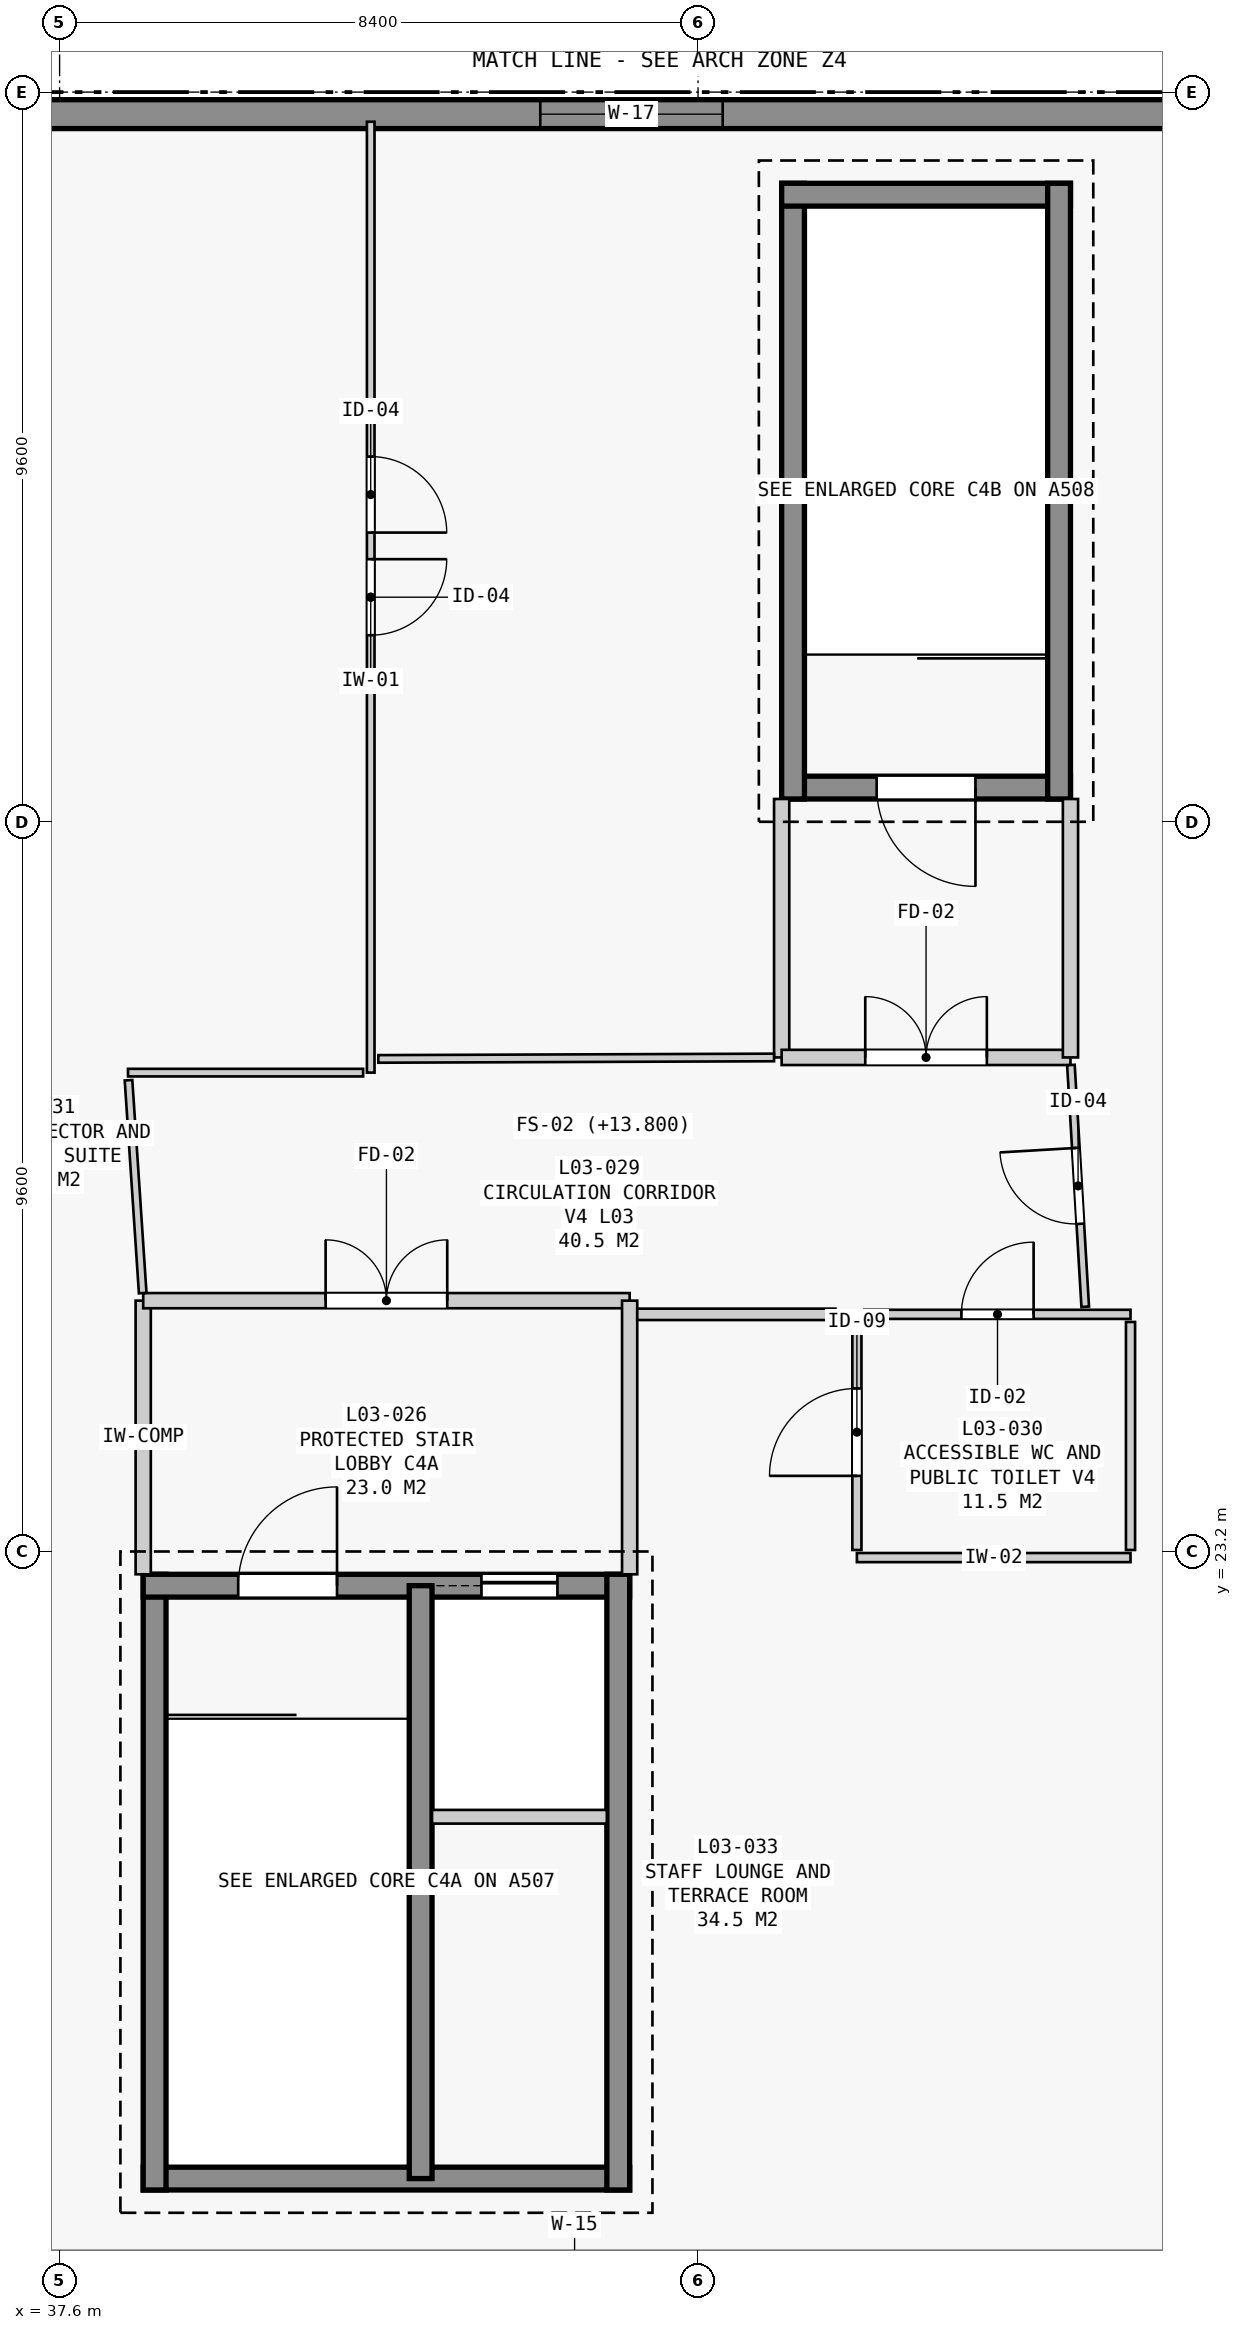
"""IFC4 building model, lengths in metres.
Left out: names, types, materials, properties, quantities, classifications, styles, units other than length and angle.
Written with IfcOpenShell. Run it as: python <this file> out.ifc"""

import sys

from ifc_helpers import new_model, si_unit, direction, frame, frame_2d, origin, place, context, subcontext, project, spatial, rectangle, extrude, element, fill, save


model = new_model("IFC4")
c1 = context("Model", 3, precision=1e-05, world=origin(), true_north=direction((0.0, 1.0)))
c2 = subcontext(c1, "Body", "Model", "MODEL_VIEW")
j1 = project(units=[si_unit("LENGTHUNIT", "METRE"), si_unit("PLANEANGLEUNIT", "RADIAN")], contexts=[c1])
p1 = place(None, origin())
s1 = spatial("IfcSite", under=j1, at=p1, CompositionType="ELEMENT")
p2 = place(p1, origin())
s2 = spatial("IfcBuilding", under=s1, at=p2, CompositionType="ELEMENT")
p3 = place(p2, frame((0.0, 0.0, 13.8)))
s3 = spatial("IfcBuildingStorey", under=s2, at=p3, CompositionType="ELEMENT", Elevation=13.8)
p4 = place(p3, frame((35.39, 42.11, 0.0), z_axis=(0.0, 0.0, 1.0), x_axis=(1.0, 0.0, 0.0)))
e1 = element("IfcWall", 1, at=p4, inside=s3, PredefinedType="STANDARD", context=c2, shape_type="SweptSolid", body=[
    extrude(rectangle(XDim=18.72, YDim=0.38, at=frame_2d((9.36, 0.0))), origin(), (0.0, 0.0, 1.0), 4.24),
])
p5 = place(p4, frame((8.534, 0.0, 1.65)))
e2 = element("IfcOpeningElement", 2, at=p5, cuts=e1, PredefinedType="OPENING", context=c2, shape_type="SweptSolid", body=[
    extrude(rectangle(XDim=2.4, YDim=1.8, at=frame_2d((1.2, 0.9))), frame((0.0, 0.2, 0.0), z_axis=(0.0, -1.0, 0.0), x_axis=(1.0, 0.0, 0.0)), (0.0, 0.0, 1.0), 0.4),
])
p6 = place(p3, frame((45.1, 14.95, 0.0), z_axis=(0.0, 0.0, 1.0), x_axis=(-1.0, 0.0, 0.0)))
e3 = element("IfcWall", 3, at=p6, inside=s3, PredefinedType="SHEAR", context=c2, shape_type="SweptSolid", body=[
    extrude(rectangle(XDim=6.4, YDim=0.3, at=frame_2d((3.2, 0.0))), origin(), (0.0, 0.0, 1.0), 4.5),
])
p7 = place(p3, frame((38.85, 14.8, 0.0), z_axis=(0.0, 0.0, 1.0), x_axis=(0.0, 1.0, 0.0)))
e4 = element("IfcWall", 4, at=p7, inside=s3, PredefinedType="SHEAR", context=c2, shape_type="SweptSolid", body=[
    extrude(rectangle(XDim=8.1, YDim=0.3, at=frame_2d((4.05, 0.0))), origin(), (0.0, 0.0, 1.0), 4.5),
])
p8 = place(p3, frame((38.7, 22.75, 0.0), z_axis=(0.0, 0.0, 1.0), x_axis=(1.0, 0.0, 0.0)))
e5 = element("IfcWall", 5, at=p8, inside=s3, PredefinedType="SHEAR", context=c2, shape_type="SweptSolid", body=[
    extrude(rectangle(XDim=6.4, YDim=0.3, at=frame_2d((3.2, 0.0))), origin(), (0.0, 0.0, 1.0), 4.5),
])
p9 = place(p8, frame((1.25, 0.0, 0.0)))
e6 = element("IfcOpeningElement", 6, at=p9, cuts=e5, PredefinedType="OPENING", context=c2, shape_type="SweptSolid", body=[
    extrude(rectangle(XDim=1.3, YDim=2.2, at=frame_2d((0.65, 1.1))), frame((0.0, 0.16, 0.0), z_axis=(0.0, -1.0, 0.0), x_axis=(1.0, 0.0, 0.0)), (0.0, 0.0, 1.0), 0.32),
])
p10 = place(p8, frame((4.45, 0.0, 0.0)))
e7 = element("IfcOpeningElement", 7, at=p10, cuts=e5, PredefinedType="OPENING", context=c2, shape_type="SweptSolid", body=[
    extrude(rectangle(XDim=1.0, YDim=2.15, at=frame_2d((0.5, 1.075))), frame((0.0, 0.16, 0.0), z_axis=(0.0, -1.0, 0.0), x_axis=(1.0, 0.0, 0.0)), (0.0, 0.0, 1.0), 0.32),
])
p11 = place(p3, frame((44.95, 22.9, 0.0), z_axis=(0.0, 0.0, 1.0), x_axis=(0.0, -1.0, 0.0)))
e8 = element("IfcWall", 8, at=p11, inside=s3, PredefinedType="SHEAR", context=c2, shape_type="SweptSolid", body=[
    extrude(rectangle(XDim=8.1, YDim=0.3, at=frame_2d((4.05, 0.0))), origin(), (0.0, 0.0, 1.0), 4.5),
])
p12 = place(p3, frame((42.35, 14.95, 0.0), z_axis=(0.0, 0.0, 1.0), x_axis=(0.0, 1.0, 0.0)))
e9 = element("IfcWall", 9, at=p12, inside=s3, PredefinedType="SHEAR", context=c2, shape_type="SweptSolid", body=[
    extrude(rectangle(XDim=7.8, YDim=0.3, at=frame_2d((3.9, 0.0))), origin(), (0.0, 0.0, 1.0), 4.5),
])
p13 = place(p3, frame((42.5, 19.71, 0.0), z_axis=(0.0, 0.0, 1.0), x_axis=(1.0, 0.0, 0.0)))
e10 = element("IfcWall", 10, at=p13, inside=s3, PredefinedType="PARTITIONING", context=c2, shape_type="SweptSolid", body=[
    extrude(rectangle(XDim=2.3, YDim=0.18, at=frame_2d((1.15, 0.0))), origin(), (0.0, 0.0, 1.0), 4.5),
])
p14 = place(p3, frame((38.7, 22.9, 0.0), z_axis=(0.0, 0.0, 1.0), x_axis=(0.0, 1.0, 0.0)))
e11 = element("IfcWall", 11, at=p14, inside=s3, PredefinedType="STANDARD", context=c2, shape_type="SweptSolid", body=[
    extrude(rectangle(XDim=3.6, YDim=0.2, at=frame_2d((1.8, 0.0))), origin(), (0.0, 0.0, 1.0), 3.52),
])
p15 = place(p3, frame((38.7, 26.5, 0.0), z_axis=(0.0, 0.0, 1.0), x_axis=(1.0, 0.0, 0.0)))
e12 = element("IfcWall", 12, at=p15, inside=s3, PredefinedType="STANDARD", context=c2, shape_type="SweptSolid", body=[
    extrude(rectangle(XDim=6.4, YDim=0.2, at=frame_2d((3.2, 0.0))), origin(), (0.0, 0.0, 1.0), 3.77),
])
p16 = place(p15, frame((2.4, 0.0, 0.0)))
e13 = element("IfcOpeningElement", 13, at=p16, cuts=e12, PredefinedType="OPENING", context=c2, shape_type="SweptSolid", body=[
    extrude(rectangle(XDim=1.6, YDim=2.2, at=frame_2d((0.8, 1.1))), frame((0.0, 0.11, 0.0), z_axis=(0.0, -1.0, 0.0), x_axis=(1.0, 0.0, 0.0)), (0.0, 0.0, 1.0), 0.22),
])
p17 = place(p3, frame((45.1, 26.5, 0.0), z_axis=(0.0, 0.0, 1.0), x_axis=(0.0, -1.0, 0.0)))
e14 = element("IfcWall", 14, at=p17, inside=s3, PredefinedType="STANDARD", context=c2, shape_type="SweptSolid", body=[
    extrude(rectangle(XDim=3.6, YDim=0.2, at=frame_2d((1.8, 0.0))), origin(), (0.0, 0.0, 1.0), 3.52),
])
p18 = place(p3, frame((50.9, 33.25, 0.0), z_axis=(0.0, 0.0, 1.0), x_axis=(-1.0, 0.0, 0.0)))
e15 = element("IfcWall", 15, at=p18, inside=s3, PredefinedType="SHEAR", context=c2, shape_type="SweptSolid", body=[
    extrude(rectangle(XDim=3.8, YDim=0.3, at=frame_2d((1.9, 0.0))), origin(), (0.0, 0.0, 1.0), 4.5),
])
p19 = place(p18, frame((1.25, 0.0, 0.0)))
e16 = element("IfcOpeningElement", 16, at=p19, cuts=e15, PredefinedType="OPENING", context=c2, shape_type="SweptSolid", body=[
    extrude(rectangle(XDim=1.3, YDim=2.2, at=frame_2d((0.65, 1.1))), frame((0.0, 0.16, 0.0), z_axis=(0.0, -1.0, 0.0), x_axis=(1.0, 0.0, 0.0)), (0.0, 0.0, 1.0), 0.32),
])
p20 = place(p3, frame((47.25, 33.1, 0.0), z_axis=(0.0, 0.0, 1.0), x_axis=(0.0, 1.0, 0.0)))
e17 = element("IfcWall", 17, at=p20, inside=s3, PredefinedType="SHEAR", context=c2, shape_type="SweptSolid", body=[
    extrude(rectangle(XDim=8.1, YDim=0.3, at=frame_2d((4.05, 0.0))), origin(), (0.0, 0.0, 1.0), 4.5),
])
p21 = place(p3, frame((47.1, 41.05, 0.0), z_axis=(0.0, 0.0, 1.0), x_axis=(1.0, 0.0, 0.0)))
e18 = element("IfcWall", 18, at=p21, inside=s3, PredefinedType="SHEAR", context=c2, shape_type="SweptSolid", body=[
    extrude(rectangle(XDim=3.8, YDim=0.3, at=frame_2d((1.9, 0.0))), origin(), (0.0, 0.0, 1.0), 4.5),
])
p22 = place(p3, frame((50.75, 41.2, 0.0), z_axis=(0.0, 0.0, 1.0), x_axis=(0.0, -1.0, 0.0)))
e19 = element("IfcWall", 19, at=p22, inside=s3, PredefinedType="SHEAR", context=c2, shape_type="SweptSolid", body=[
    extrude(rectangle(XDim=8.1, YDim=0.3, at=frame_2d((4.05, 0.0))), origin(), (0.0, 0.0, 1.0), 4.5),
])
p23 = place(p3, frame((47.1, 33.1, 0.0), z_axis=(0.0, 0.0, 1.0), x_axis=(0.0, -1.0, 0.0)))
e20 = element("IfcWall", 20, at=p23, inside=s3, PredefinedType="STANDARD", context=c2, shape_type="SweptSolid", body=[
    extrude(rectangle(XDim=3.4, YDim=0.2, at=frame_2d((1.7, 0.0))), origin(), (0.0, 0.0, 1.0), 3.47),
])
p24 = place(p3, frame((47.1, 29.7, 0.0), z_axis=(0.0, 0.0, 1.0), x_axis=(1.0, 0.0, 0.0)))
e21 = element("IfcWall", 21, at=p24, inside=s3, PredefinedType="STANDARD", context=c2, shape_type="SweptSolid", body=[
    extrude(rectangle(XDim=3.8, YDim=0.2, at=frame_2d((1.9, 0.0))), origin(), (0.0, 0.0, 1.0), 4.5),
])
p25 = place(p24, frame((1.1, 0.0, 0.0)))
e22 = element("IfcOpeningElement", 22, at=p25, cuts=e21, PredefinedType="OPENING", context=c2, shape_type="SweptSolid", body=[
    extrude(rectangle(XDim=1.6, YDim=2.2, at=frame_2d((0.8, 1.1))), frame((0.0, 0.11, 0.0), z_axis=(0.0, -1.0, 0.0), x_axis=(1.0, 0.0, 0.0)), (0.0, 0.0, 1.0), 0.22),
])
p26 = place(p3, frame((50.9, 29.7, 0.0), z_axis=(0.0, 0.0, 1.0), x_axis=(0.0, 1.0, 0.0)))
e23 = element("IfcWall", 23, at=p26, inside=s3, PredefinedType="STANDARD", context=c2, shape_type="SweptSolid", body=[
    extrude(rectangle(XDim=3.4, YDim=0.2, at=frame_2d((1.7, 0.0))), origin(), (0.0, 0.0, 1.0), 3.47),
])
p27 = place(p3, frame((51.69, 23.12, 0.0), z_axis=(0.0, 0.0, 1.0), x_axis=(-1.0, 0.0, 0.0)))
e24 = element("IfcWall", 24, at=p27, inside=s3, PredefinedType="PARTITIONING", context=c2, shape_type="SweptSolid", body=[
    extrude(rectangle(XDim=3.6, YDim=0.12, at=frame_2d((1.8, 0.0))), origin(), (0.0, 0.0, 1.0), 3.52),
])
p28 = place(p3, frame((48.09, 23.22, 0.0), z_axis=(0.0, 0.0, 1.0), x_axis=(0.0, 1.0, 0.0)))
e25 = element("IfcWall", 25, at=p28, inside=s3, PredefinedType="PARTITIONING", context=c2, shape_type="SweptSolid", body=[
    extrude(rectangle(XDim=3.1, YDim=0.12, at=frame_2d((1.55, 0.0))), origin(), (0.0, 0.0, 1.0), 3.52),
])
p29 = place(p28, frame((0.975, 0.0, 0.0)))
e26 = element("IfcOpeningElement", 26, at=p29, cuts=e25, PredefinedType="OPENING", context=c2, shape_type="SweptSolid", body=[
    extrude(rectangle(XDim=1.15, YDim=2.2, at=frame_2d((0.575, 1.1))), frame((0.0, 0.07, 0.0), z_axis=(0.0, -1.0, 0.0), x_axis=(1.0, 0.0, 0.0)), (0.0, 0.0, 1.0), 0.14),
])
p30 = place(p3, frame((48.19, 26.32, 0.0), z_axis=(0.0, 0.0, 1.0), x_axis=(1.0, 0.0, 0.0)))
e27 = element("IfcWall", 27, at=p30, inside=s3, PredefinedType="PARTITIONING", context=c2, shape_type="SweptSolid", body=[
    extrude(rectangle(XDim=3.5, YDim=0.12, at=frame_2d((1.75, 0.0))), origin(), (0.0, 0.0, 1.0), 4.24),
])
p31 = place(p30, frame((1.275, 0.0, 0.0)))
e28 = element("IfcOpeningElement", 28, at=p31, cuts=e27, PredefinedType="OPENING", context=c2, shape_type="SweptSolid", body=[
    extrude(rectangle(XDim=0.95, YDim=2.15, at=frame_2d((0.475, 1.075))), frame((0.0, 0.07, 0.0), z_axis=(0.0, -1.0, 0.0), x_axis=(1.0, 0.0, 0.0)), (0.0, 0.0, 1.0), 0.14),
])
p32 = place(p3, frame((51.69, 26.22, 0.0), z_axis=(0.0, 0.0, 1.0), x_axis=(0.0, -1.0, 0.0)))
e29 = element("IfcWall", 29, at=p32, inside=s3, PredefinedType="PARTITIONING", context=c2, shape_type="SweptSolid", body=[
    extrude(rectangle(XDim=3.0, YDim=0.12, at=frame_2d((1.5, 0.0))), origin(), (0.0, 0.0, 1.0), 3.52),
])
p33 = place(p3, frame((41.693, 42.01, 0.0), z_axis=(0.0, 0.0, 1.0), x_axis=(0.0, -1.0, 0.0)))
e30 = element("IfcWall", 30, at=p33, inside=s3, PredefinedType="PARTITIONING", context=c2, shape_type="SweptSolid", body=[
    extrude(rectangle(XDim=12.51, YDim=0.1, at=frame_2d((6.255, 0.0))), origin(), (0.0, 0.0, 1.0), 3.42),
])
p34 = place(p33, frame((5.755, 0.0, 0.0)))
e31 = element("IfcOpeningElement", 31, at=p34, cuts=e30, PredefinedType="OPENING", context=c2, shape_type="SweptSolid", body=[
    extrude(rectangle(XDim=1.0, YDim=2.15, at=frame_2d((0.5, 1.075))), frame((0.0, 0.06, 0.0), z_axis=(0.0, -1.0, 0.0), x_axis=(1.0, 0.0, 0.0)), (0.0, 0.0, 1.0), 0.12),
])
p35 = place(p33, frame((4.405, 0.0, 0.0)))
e32 = element("IfcOpeningElement", 32, at=p35, cuts=e30, PredefinedType="OPENING", context=c2, shape_type="SweptSolid", body=[
    extrude(rectangle(XDim=1.0, YDim=2.15, at=frame_2d((0.5, 1.075))), frame((0.0, 0.06, 0.0), z_axis=(0.0, -1.0, 0.0), x_axis=(1.0, 0.0, 0.0)), (0.0, 0.0, 1.0), 0.12),
])
p36 = place(p3, frame((41.593, 29.5, 0.0), z_axis=(0.0, 0.0, 1.0), x_axis=(-1.0, 0.0, 0.0)))
e33 = element("IfcWall", 33, at=p36, inside=s3, PredefinedType="PARTITIONING", context=c2, shape_type="SweptSolid", body=[
    extrude(rectangle(XDim=3.093, YDim=0.1, at=frame_2d((1.547, 0.0))), origin(), (0.0, 0.0, 1.0), 4.24),
])
p37 = place(p3, frame((38.507, 29.4, 0.0), z_axis=(0.0, 0.0, 1.0), x_axis=(0.066547879088, -0.997783232866, 0.0)))
e34 = element("IfcWall", 34, at=p37, inside=s3, PredefinedType="PARTITIONING", context=c2, shape_type="SweptSolid", body=[
    extrude(rectangle(XDim=2.806, YDim=0.1, at=frame_2d((1.403, 0.0))), origin(), (0.0, 0.0, 1.0), 4.24),
])
p38 = place(p3, frame((47.0, 29.7, 0.0), z_axis=(0.0, 0.0, 1.0), x_axis=(-0.99999313943, -0.003704199279, 0.0)))
e35 = element("IfcWall", 35, at=p38, inside=s3, PredefinedType="PARTITIONING", context=c2, shape_type="SweptSolid", body=[
    extrude(rectangle(XDim=5.207, YDim=0.1, at=frame_2d((2.604, 0.0))), origin(), (0.0, 0.0, 1.0), 3.77),
])
p39 = place(p3, frame((45.2, 26.32, 0.0), z_axis=(0.0, 0.0, 1.0), x_axis=(1.0, 0.0, 0.0)))
e36 = element("IfcWall", 36, at=p39, inside=s3, PredefinedType="PARTITIONING", context=c2, shape_type="SweptSolid", body=[
    extrude(rectangle(XDim=2.607, YDim=0.15, at=frame_2d((1.303, 0.0))), origin(), (0.0, 0.0, 1.0), 4.24),
])
p40 = place(p3, frame((51.094, 26.42, 0.0), z_axis=(0.0, 0.0, 1.0), x_axis=(-0.059009535749, 0.998257419051, 0.0)))
e37 = element("IfcWall", 37, at=p40, inside=s3, PredefinedType="PARTITIONING", context=c2, shape_type="SweptSolid", body=[
    extrude(rectangle(XDim=3.186, YDim=0.1, at=frame_2d((1.593, 0.0))), origin(), (0.0, 0.0, 1.0), 4.24),
])
p41 = place(p40, frame((1.093, 0.0, 0.0)))
e38 = element("IfcOpeningElement", 38, at=p41, cuts=e37, PredefinedType="OPENING", context=c2, shape_type="SweptSolid", body=[
    extrude(rectangle(XDim=1.0, YDim=2.15, at=frame_2d((0.5, 1.075))), frame((0.0, 0.06, 0.0), z_axis=(0.0, -1.0, 0.0), x_axis=(1.0, 0.0, 0.0)), (0.0, 0.0, 1.0), 0.12),
])
p42 = place(p5, origin())
e39 = element("IfcWindow", 39, at=p42, inside=s3, PartitioningType="SINGLE_PANEL", PredefinedType="WINDOW", context=c2, shape_type="SweptSolid", body=[
    extrude(rectangle(XDim=2.4, YDim=1.8, at=frame_2d((1.2, 0.9))), frame((0.0, 0.03, 0.0), z_axis=(0.0, -1.0, 0.0), x_axis=(1.0, 0.0, 0.0)), (0.0, 0.0, 1.0), 0.06),
])
fill(e2, e39)
p43 = place(p9, origin())
e40 = element("IfcDoor", 40, at=p43, inside=s3, OperationType="SINGLE_SWING_RIGHT", PredefinedType="DOOR", context=c2, shape_type="SweptSolid", body=[
    extrude(rectangle(XDim=1.3, YDim=2.2, at=frame_2d((0.65, 1.1))), frame((0.0, 0.025, 0.0), z_axis=(0.0, -1.0, 0.0), x_axis=(1.0, 0.0, 0.0)), (0.0, 0.0, 1.0), 0.05),
])
fill(e6, e40)
p44 = place(p10, origin())
e41 = element("IfcDoor", 41, at=p44, inside=s3, OperationType="SLIDING_TO_LEFT", PredefinedType="DOOR", context=c2, shape_type="SweptSolid", body=[
    extrude(rectangle(XDim=1.0, YDim=2.15, at=frame_2d((0.5, 1.075))), frame((0.0, 0.025, 0.0), z_axis=(0.0, -1.0, 0.0), x_axis=(1.0, 0.0, 0.0)), (0.0, 0.0, 1.0), 0.05),
])
fill(e7, e41)
p45 = place(p19, origin())
e42 = element("IfcDoor", 42, at=p45, inside=s3, OperationType="SINGLE_SWING_LEFT", PredefinedType="DOOR", context=c2, shape_type="SweptSolid", body=[
    extrude(rectangle(XDim=1.3, YDim=2.2, at=frame_2d((0.65, 1.1))), frame((0.0, 0.025, 0.0), z_axis=(0.0, -1.0, 0.0), x_axis=(1.0, 0.0, 0.0)), (0.0, 0.0, 1.0), 0.05),
])
fill(e16, e42)
p46 = place(p16, origin())
e43 = element("IfcDoor", 43, at=p46, inside=s3, OperationType="DOUBLE_DOOR_SINGLE_SWING", PredefinedType="DOOR", context=c2, shape_type="SweptSolid", body=[
    extrude(rectangle(XDim=1.6, YDim=2.2, at=frame_2d((0.8, 1.1))), frame((0.0, 0.025, 0.0), z_axis=(0.0, -1.0, 0.0), x_axis=(1.0, 0.0, 0.0)), (0.0, 0.0, 1.0), 0.05),
])
fill(e13, e43)
p47 = place(p25, origin())
e44 = element("IfcDoor", 44, at=p47, inside=s3, OperationType="DOUBLE_DOOR_SINGLE_SWING", PredefinedType="DOOR", context=c2, shape_type="SweptSolid", body=[
    extrude(rectangle(XDim=1.6, YDim=2.2, at=frame_2d((0.8, 1.1))), frame((0.0, 0.025, 0.0), z_axis=(0.0, -1.0, 0.0), x_axis=(1.0, 0.0, 0.0)), (0.0, 0.0, 1.0), 0.05),
])
fill(e22, e44)
p48 = place(p31, origin())
e45 = element("IfcDoor", 45, at=p48, inside=s3, OperationType="SINGLE_SWING_RIGHT", PredefinedType="DOOR", context=c2, shape_type="SweptSolid", body=[
    extrude(rectangle(XDim=0.95, YDim=2.15, at=frame_2d((0.475, 1.075))), frame((0.0, 0.025, 0.0), z_axis=(0.0, -1.0, 0.0), x_axis=(1.0, 0.0, 0.0)), (0.0, 0.0, 1.0), 0.05),
])
fill(e28, e45)
p49 = place(p34, origin())
e46 = element("IfcDoor", 46, at=p49, inside=s3, OperationType="SINGLE_SWING_LEFT", PredefinedType="DOOR", context=c2, shape_type="SweptSolid", body=[
    extrude(rectangle(XDim=1.0, YDim=2.15, at=frame_2d((0.5, 1.075))), frame((0.0, 0.025, 0.0), z_axis=(0.0, -1.0, 0.0), x_axis=(1.0, 0.0, 0.0)), (0.0, 0.0, 1.0), 0.05),
])
fill(e31, e46)
p50 = place(p35, origin())
e47 = element("IfcDoor", 47, at=p50, inside=s3, OperationType="SINGLE_SWING_RIGHT", PredefinedType="DOOR", context=c2, shape_type="SweptSolid", body=[
    extrude(rectangle(XDim=1.0, YDim=2.15, at=frame_2d((0.5, 1.075))), frame((0.0, 0.025, 0.0), z_axis=(0.0, -1.0, 0.0), x_axis=(1.0, 0.0, 0.0)), (0.0, 0.0, 1.0), 0.05),
])
fill(e32, e47)
p51 = place(p29, origin())
e48 = element("IfcDoor", 48, at=p51, inside=s3, OperationType="SINGLE_SWING_LEFT", PredefinedType="DOOR", context=c2, shape_type="SweptSolid", body=[
    extrude(rectangle(XDim=1.15, YDim=2.2, at=frame_2d((0.575, 1.1))), frame((0.0, 0.025, 0.0), z_axis=(0.0, -1.0, 0.0), x_axis=(1.0, 0.0, 0.0)), (0.0, 0.0, 1.0), 0.05),
])
fill(e26, e48)
p52 = place(p41, origin())
e49 = element("IfcDoor", 49, at=p52, inside=s3, OperationType="SINGLE_SWING_RIGHT", PredefinedType="DOOR", context=c2, shape_type="SweptSolid", body=[
    extrude(rectangle(XDim=1.0, YDim=2.15, at=frame_2d((0.5, 1.075))), frame((0.0, 0.025, 0.0), z_axis=(0.0, -1.0, 0.0), x_axis=(1.0, 0.0, 0.0)), (0.0, 0.0, 1.0), 0.05),
])
fill(e38, e49)
save(model, sys.argv[1])
